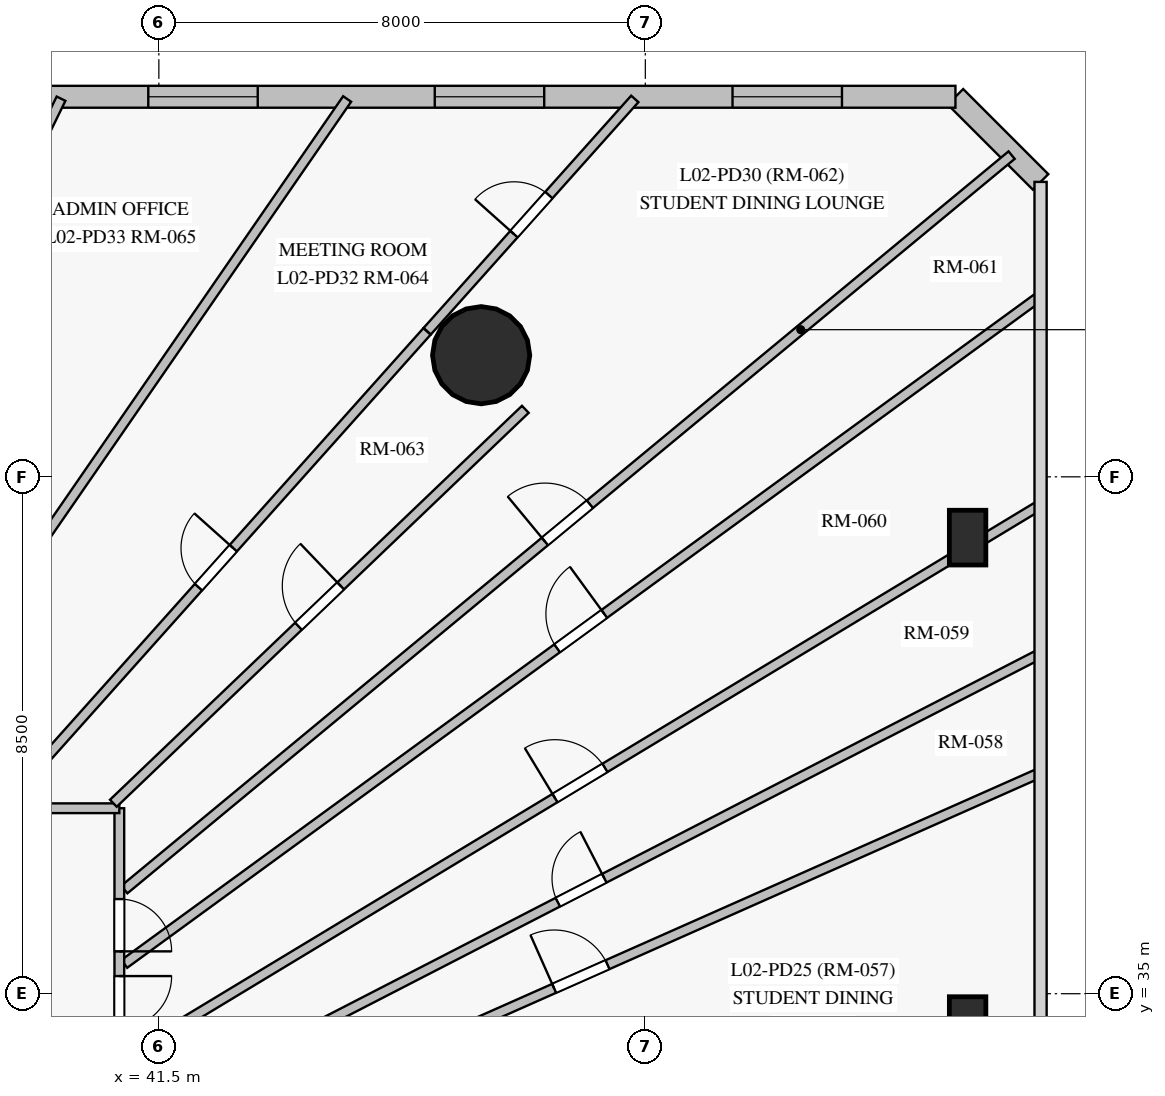
"""IFC4 building model, lengths in metres.
Left out: names, types, materials, properties, quantities, classifications, styles, units other than length and angle.
Written with IfcOpenShell. Run it as: python <this file> out.ifc"""

import sys

from ifc_helpers import new_model, si_unit, direction, frame, frame_2d, origin, origin_with_axes, origin_2d, place, context, subcontext, project, spatial, rectangle, circle, extrude, source, transform, mapped, element, fill, save


model = new_model("IFC4")
c1 = context("Model", 3, precision=1e-05, world=origin(), true_north=direction((0.0, 1.0)))
c2 = subcontext(c1, "Body", "Model", "MODEL_VIEW")
j1 = project(units=[si_unit("LENGTHUNIT", "METRE"), si_unit("PLANEANGLEUNIT", "RADIAN")], contexts=[c1])
p1 = place(None, origin())
s1 = spatial("IfcSite", under=j1, at=p1, CompositionType="ELEMENT")
p2 = place(p1, origin())
s2 = spatial("IfcBuilding", under=s1, at=p2, CompositionType="ELEMENT")
p3 = place(p2, frame((0.0, 0.0, 9.0)))
s3 = spatial("IfcBuildingStorey", under=s2, at=p3, CompositionType="ELEMENT", Elevation=9.0)
m1 = source(origin_with_axes(), c2, "Body", "SweptSolid", [
    extrude(circle(Radius=0.8, at=origin_2d()), origin(), (0.0, 0.0, 1.0), 4.5),
])
p4 = place(p3, frame((46.8, 45.5, 0.0), z_axis=(0.0, 0.0, 1.0), x_axis=(1.0, 0.0, 0.0)))
e1 = element("IfcColumn", 1, at=p4, inside=s3, PredefinedType="COLUMN", context=c2, shape_type="MappedRepresentation", body=[
    mapped(m1, transform((0.0, 0.0, 0.0), scale=1.0)),
])
m2 = source(origin_with_axes(), c2, "Body", "SweptSolid", [
    extrude(rectangle(XDim=0.6, YDim=0.9, at=origin_2d()), origin(), (0.0, 0.0, 1.0), 4.5),
])
for number, where, z_axis, x_axis in (
    (2, (54.8, 34.5, 0.0), (0.0, 0.0, 1.0), (1.0, 0.0, 0.0)),
    (3, (54.8, 42.5, 0.0), (0.0, 0.0, 1.0), (1.0, 0.0, 0.0)),
):
    element("IfcColumn", number, at=place(p3, frame(where, z_axis=z_axis, x_axis=x_axis)), inside=s3, PredefinedType="PILASTER", context=c2, shape_type="MappedRepresentation", body=[
        mapped(m2, transform((0.0, 0.0, 0.0), scale=1.0)),
    ])
p5 = place(p3, frame((56.0, 48.35, 0.0), z_axis=(0.0, 0.0, 1.0), x_axis=(-0.707106781187, 0.707106781187, 0.0)))
e4 = element("IfcWall", 4, at=p5, inside=s3, PredefinedType="SOLIDWALL", context=c2, shape_type="SweptSolid", body=[
    extrude(rectangle(XDim=1.98, YDim=0.36, at=frame_2d((0.99, 0.0))), origin(), (0.0, 0.0, 1.0), 4.2),
])
p6 = place(p3, frame((54.6, 49.75, 0.0), z_axis=(0.0, 0.0, 1.0), x_axis=(-1.0, 0.0, 0.0)))
e5 = element("IfcWall", 5, at=p6, inside=s3, PredefinedType="SOLIDWALL", context=c2, shape_type="SweptSolid", body=[
    extrude(rectangle(XDim=49.25, YDim=0.36, at=frame_2d((24.625, 0.0))), origin(), (0.0, 0.0, 1.0), 4.2),
])
p7 = place(p6, frame((1.866, 0.0, 0.85)))
e6 = element("IfcOpeningElement", 6, at=p7, cuts=e5, PredefinedType="OPENING", context=c2, shape_type="SweptSolid", body=[
    extrude(rectangle(XDim=1.8, YDim=2.2, at=frame_2d((0.9, 1.1))), frame((0.0, 0.19, 0.0), z_axis=(0.0, -1.0, 0.0), x_axis=(1.0, 0.0, 0.0)), (0.0, 0.0, 1.0), 0.38),
])
p8 = place(p6, frame((6.763, 0.0, 0.85)))
e7 = element("IfcOpeningElement", 7, at=p8, cuts=e5, PredefinedType="OPENING", context=c2, shape_type="SweptSolid", body=[
    extrude(rectangle(XDim=1.8, YDim=2.2, at=frame_2d((0.9, 1.1))), frame((0.0, 0.19, 0.0), z_axis=(0.0, -1.0, 0.0), x_axis=(1.0, 0.0, 0.0)), (0.0, 0.0, 1.0), 0.38),
])
p9 = place(p6, frame((11.474, 0.0, 0.85)))
e8 = element("IfcOpeningElement", 8, at=p9, cuts=e5, PredefinedType="OPENING", context=c2, shape_type="SweptSolid", body=[
    extrude(rectangle(XDim=1.8, YDim=2.2, at=frame_2d((0.9, 1.1))), frame((0.0, 0.19, 0.0), z_axis=(0.0, -1.0, 0.0), x_axis=(1.0, 0.0, 0.0)), (0.0, 0.0, 1.0), 0.38),
])
p10 = place(p6, frame((16.083, 0.0, 0.85)))
e9 = element("IfcOpeningElement", 9, at=p10, cuts=e5, PredefinedType="OPENING", context=c2, shape_type="SweptSolid", body=[
    extrude(rectangle(XDim=1.8, YDim=2.2, at=frame_2d((0.9, 1.1))), frame((0.0, 0.19, 0.0), z_axis=(0.0, -1.0, 0.0), x_axis=(1.0, 0.0, 0.0)), (0.0, 0.0, 1.0), 0.38),
])
p11 = place(p6, frame((20.595, 0.0, 0.85)))
e10 = element("IfcOpeningElement", 10, at=p11, cuts=e5, PredefinedType="OPENING", context=c2, shape_type="SweptSolid", body=[
    extrude(rectangle(XDim=1.8, YDim=2.2, at=frame_2d((0.9, 1.1))), frame((0.0, 0.19, 0.0), z_axis=(0.0, -1.0, 0.0), x_axis=(1.0, 0.0, 0.0)), (0.0, 0.0, 1.0), 0.38),
])
p12 = place(p6, frame((24.23, 0.0, 0.85)))
e11 = element("IfcOpeningElement", 11, at=p12, cuts=e5, PredefinedType="OPENING", context=c2, shape_type="SweptSolid", body=[
    extrude(rectangle(XDim=1.8, YDim=2.2, at=frame_2d((0.9, 1.1))), frame((0.0, 0.19, 0.0), z_axis=(0.0, -1.0, 0.0), x_axis=(1.0, 0.0, 0.0)), (0.0, 0.0, 1.0), 0.38),
])
p13 = place(p6, frame((30.4, 0.0, 0.85)))
e12 = element("IfcOpeningElement", 12, at=p13, cuts=e5, PredefinedType="OPENING", context=c2, shape_type="SweptSolid", body=[
    extrude(rectangle(XDim=1.8, YDim=2.2, at=frame_2d((0.9, 1.1))), frame((0.0, 0.19, 0.0), z_axis=(0.0, -1.0, 0.0), x_axis=(1.0, 0.0, 0.0)), (0.0, 0.0, 1.0), 0.38),
])
p14 = place(p6, frame((35.42, 0.0, 0.85)))
e13 = element("IfcOpeningElement", 13, at=p14, cuts=e5, PredefinedType="OPENING", context=c2, shape_type="SweptSolid", body=[
    extrude(rectangle(XDim=1.8, YDim=2.2, at=frame_2d((0.9, 1.1))), frame((0.0, 0.19, 0.0), z_axis=(0.0, -1.0, 0.0), x_axis=(1.0, 0.0, 0.0)), (0.0, 0.0, 1.0), 0.38),
])
p15 = place(p6, frame((40.69, 0.0, 0.85)))
e14 = element("IfcOpeningElement", 14, at=p15, cuts=e5, PredefinedType="OPENING", context=c2, shape_type="SweptSolid", body=[
    extrude(rectangle(XDim=1.8, YDim=2.2, at=frame_2d((0.9, 1.1))), frame((0.0, 0.19, 0.0), z_axis=(0.0, -1.0, 0.0), x_axis=(1.0, 0.0, 0.0)), (0.0, 0.0, 1.0), 0.38),
])
p16 = place(p6, frame((45.58, 0.0, 0.85)))
e15 = element("IfcOpeningElement", 15, at=p16, cuts=e5, PredefinedType="OPENING", context=c2, shape_type="SweptSolid", body=[
    extrude(rectangle(XDim=1.8, YDim=2.2, at=frame_2d((0.9, 1.1))), frame((0.0, 0.19, 0.0), z_axis=(0.0, -1.0, 0.0), x_axis=(1.0, 0.0, 0.0)), (0.0, 0.0, 1.0), 0.38),
])
p17 = place(p3, frame((40.932, 36.712, 0.0), z_axis=(0.0, 0.0, 1.0), x_axis=(0.770350004389, 0.637621259635, 0.0)))
e16 = element("IfcWall", 16, at=p17, inside=s3, PredefinedType="PARTITIONING", context=c2, shape_type="SweptSolid", body=[
    extrude(rectangle(XDim=18.942, YDim=0.16, at=frame_2d((9.471, 0.0))), origin(), (0.0, 0.0, 1.0), 4.2),
])
p18 = place(p17, frame((8.979, 0.0, 0.0)))
e17 = element("IfcOpeningElement", 17, at=p18, cuts=e16, PredefinedType="OPENING", context=c2, shape_type="SweptSolid", body=[
    extrude(rectangle(XDim=0.96, YDim=2.15, at=frame_2d((0.48, 1.075))), frame((0.0, 0.09, 0.0), z_axis=(0.0, -1.0, 0.0), x_axis=(1.0, 0.0, 0.0)), (0.0, 0.0, 1.0), 0.18),
])
p19 = place(p3, frame((40.932, 35.49, 0.0), z_axis=(0.0, 0.0, 1.0), x_axis=(0.808014689356, 0.589162339076, 0.0)))
e18 = element("IfcWall", 18, at=p19, inside=s3, PredefinedType="PARTITIONING", context=c2, shape_type="SweptSolid", body=[
    extrude(rectangle(XDim=18.602, YDim=0.16, at=frame_2d((9.301, 0.0))), origin(), (0.0, 0.0, 1.0), 4.2),
])
p20 = place(p19, frame((8.808, 0.0, 0.0)))
e19 = element("IfcOpeningElement", 19, at=p20, cuts=e18, PredefinedType="OPENING", context=c2, shape_type="SweptSolid", body=[
    extrude(rectangle(XDim=0.96, YDim=2.15, at=frame_2d((0.48, 1.075))), frame((0.0, 0.09, 0.0), z_axis=(0.0, -1.0, 0.0), x_axis=(1.0, 0.0, 0.0)), (0.0, 0.0, 1.0), 0.18),
])
p21 = place(p3, frame((40.85, 38.05, 0.0), z_axis=(0.0, 0.0, 1.0), x_axis=(0.0, -1.0, 0.0)))
e20 = element("IfcWall", 20, at=p21, inside=s3, PredefinedType="PARTITIONING", context=c2, shape_type="SweptSolid", body=[
    extrude(rectangle(XDim=18.508, YDim=0.16, at=frame_2d((9.254, 0.0))), origin(), (0.0, 0.0, 1.0), 3.25),
])
p22 = place(p21, frame((13.87, 0.0, 0.0)))
e21 = element("IfcOpeningElement", 21, at=p22, cuts=e20, PredefinedType="OPENING", context=c2, shape_type="SweptSolid", body=[
    extrude(rectangle(XDim=0.96, YDim=2.15, at=frame_2d((0.48, 1.075))), frame((0.0, 0.09, 0.0), z_axis=(0.0, -1.0, 0.0), x_axis=(1.0, 0.0, 0.0)), (0.0, 0.0, 1.0), 0.18),
])
p23 = place(p21, frame((8.695, 0.0, 0.0)))
e22 = element("IfcOpeningElement", 22, at=p23, cuts=e20, PredefinedType="OPENING", context=c2, shape_type="SweptSolid", body=[
    extrude(rectangle(XDim=0.96, YDim=2.15, at=frame_2d((0.48, 1.075))), frame((0.0, 0.09, 0.0), z_axis=(0.0, -1.0, 0.0), x_axis=(1.0, 0.0, 0.0)), (0.0, 0.0, 1.0), 0.18),
])
p24 = place(p21, frame((6.334, 0.0, 0.0)))
e23 = element("IfcOpeningElement", 23, at=p24, cuts=e20, PredefinedType="OPENING", context=c2, shape_type="SweptSolid", body=[
    extrude(rectangle(XDim=0.96, YDim=2.15, at=frame_2d((0.48, 1.075))), frame((0.0, 0.09, 0.0), z_axis=(0.0, -1.0, 0.0), x_axis=(1.0, 0.0, 0.0)), (0.0, 0.0, 1.0), 0.18),
])
p25 = place(p21, frame((12.2, 0.0, 0.0)))
e24 = element("IfcOpeningElement", 24, at=p25, cuts=e20, PredefinedType="OPENING", context=c2, shape_type="SweptSolid", body=[
    extrude(rectangle(XDim=0.96, YDim=2.15, at=frame_2d((0.48, 1.075))), frame((0.0, 0.09, 0.0), z_axis=(0.0, -1.0, 0.0), x_axis=(1.0, 0.0, 0.0)), (0.0, 0.0, 1.0), 0.18),
])
p26 = place(p21, frame((2.76, 0.0, 0.0)))
e25 = element("IfcOpeningElement", 25, at=p26, cuts=e20, PredefinedType="OPENING", context=c2, shape_type="SweptSolid", body=[
    extrude(rectangle(XDim=0.86, YDim=2.04, at=frame_2d((0.43, 1.02))), frame((0.0, 0.09, 0.0), z_axis=(0.0, -1.0, 0.0), x_axis=(1.0, 0.0, 0.0)), (0.0, 0.0, 1.0), 0.18),
])
p27 = place(p21, frame((1.494, 0.0, 0.0)))
e26 = element("IfcOpeningElement", 26, at=p27, cuts=e20, PredefinedType="OPENING", context=c2, shape_type="SweptSolid", body=[
    extrude(rectangle(XDim=0.86, YDim=2.04, at=frame_2d((0.43, 1.02))), frame((0.0, 0.09, 0.0), z_axis=(0.0, -1.0, 0.0), x_axis=(1.0, 0.0, 0.0)), (0.0, 0.0, 1.0), 0.18),
])
p28 = place(p3, frame((40.919, 33.932, 0.0), z_axis=(0.0, 0.0, 1.0), x_axis=(0.855961001887, 0.517040388412, 0.0)))
e27 = element("IfcWall", 27, at=p28, inside=s3, PredefinedType="PARTITIONING", context=c2, shape_type="SweptSolid", body=[
    extrude(rectangle(XDim=17.579, YDim=0.16, at=frame_2d((8.789, 0.0))), origin(), (0.0, 0.0, 1.0), 4.2),
])
p29 = place(p28, frame((8.289, 0.0, 0.0)))
e28 = element("IfcOpeningElement", 28, at=p29, cuts=e27, PredefinedType="OPENING", context=c2, shape_type="SweptSolid", body=[
    extrude(rectangle(XDim=0.96, YDim=2.15, at=frame_2d((0.48, 1.075))), frame((0.0, 0.09, 0.0), z_axis=(0.0, -1.0, 0.0), x_axis=(1.0, 0.0, 0.0)), (0.0, 0.0, 1.0), 0.18),
])
p30 = place(p3, frame((40.919, 32.827, 0.0), z_axis=(0.0, 0.0, 1.0), x_axis=(0.8890624387, 0.457785954452, 0.0)))
e29 = element("IfcWall", 29, at=p30, inside=s3, PredefinedType="PARTITIONING", context=c2, shape_type="SweptSolid", body=[
    extrude(rectangle(XDim=16.927, YDim=0.16, at=frame_2d((8.464, 0.0))), origin(), (0.0, 0.0, 1.0), 4.2),
])
p31 = place(p30, frame((8.033, 0.0, 0.0)))
e30 = element("IfcOpeningElement", 30, at=p31, cuts=e29, PredefinedType="OPENING", context=c2, shape_type="SweptSolid", body=[
    extrude(rectangle(XDim=0.86, YDim=2.04, at=frame_2d((0.43, 1.02))), frame((0.0, 0.09, 0.0), z_axis=(0.0, -1.0, 0.0), x_axis=(1.0, 0.0, 0.0)), (0.0, 0.0, 1.0), 0.18),
])
p32 = place(p3, frame((40.932, 31.951, 0.0), z_axis=(0.0, 0.0, 1.0), x_axis=(0.914043329039, 0.405616558636, 0.0)))
e31 = element("IfcWall", 31, at=p32, inside=s3, PredefinedType="PARTITIONING", context=c2, shape_type="SweptSolid", body=[
    extrude(rectangle(XDim=16.452, YDim=0.16, at=frame_2d((8.226, 0.0))), origin(), (0.0, 0.0, 1.0), 4.2),
])
p33 = place(p32, frame((7.733, 0.0, 0.0)))
e32 = element("IfcOpeningElement", 32, at=p33, cuts=e31, PredefinedType="OPENING", context=c2, shape_type="SweptSolid", body=[
    extrude(rectangle(XDim=0.96, YDim=2.15, at=frame_2d((0.48, 1.075))), frame((0.0, 0.09, 0.0), z_axis=(0.0, -1.0, 0.0), x_axis=(1.0, 0.0, 0.0)), (0.0, 0.0, 1.0), 0.18),
])
p34 = place(p3, frame((25.4, 38.05, 0.0), z_axis=(0.0, 0.0, 1.0), x_axis=(1.0, 0.0, 0.0)))
e33 = element("IfcWall", 33, at=p34, inside=s3, PredefinedType="PARTITIONING", context=c2, shape_type="SweptSolid", body=[
    extrude(rectangle(XDim=15.45, YDim=0.16, at=frame_2d((7.725, 0.0))), origin(), (0.0, 0.0, 1.0), 4.2),
])
p35 = place(p34, frame((11.802, 0.0, 0.0)))
e34 = element("IfcOpeningElement", 34, at=p35, cuts=e33, PredefinedType="OPENING", context=c2, shape_type="SweptSolid", body=[
    extrude(rectangle(XDim=0.96, YDim=2.15, at=frame_2d((0.48, 1.075))), frame((0.0, 0.09, 0.0), z_axis=(0.0, -1.0, 0.0), x_axis=(1.0, 0.0, 0.0)), (0.0, 0.0, 1.0), 0.18),
])
p36 = place(p34, frame((9.567, 0.0, 0.0)))
e35 = element("IfcOpeningElement", 35, at=p36, cuts=e33, PredefinedType="OPENING", context=c2, shape_type="SweptSolid", body=[
    extrude(rectangle(XDim=0.96, YDim=2.15, at=frame_2d((0.48, 1.075))), frame((0.0, 0.09, 0.0), z_axis=(0.0, -1.0, 0.0), x_axis=(1.0, 0.0, 0.0)), (0.0, 0.0, 1.0), 0.18),
])
p37 = place(p34, frame((7.25, 0.0, 0.0)))
e36 = element("IfcOpeningElement", 36, at=p37, cuts=e33, PredefinedType="OPENING", context=c2, shape_type="SweptSolid", body=[
    extrude(rectangle(XDim=0.96, YDim=2.15, at=frame_2d((0.48, 1.075))), frame((0.0, 0.09, 0.0), z_axis=(0.0, -1.0, 0.0), x_axis=(1.0, 0.0, 0.0)), (0.0, 0.0, 1.0), 0.18),
])
p38 = place(p34, frame((4.933, 0.0, 0.0)))
e37 = element("IfcOpeningElement", 37, at=p38, cuts=e33, PredefinedType="OPENING", context=c2, shape_type="SweptSolid", body=[
    extrude(rectangle(XDim=0.96, YDim=2.15, at=frame_2d((0.48, 1.075))), frame((0.0, 0.09, 0.0), z_axis=(0.0, -1.0, 0.0), x_axis=(1.0, 0.0, 0.0)), (0.0, 0.0, 1.0), 0.18),
])
p39 = place(p34, frame((1.698, 0.0, 0.0)))
e38 = element("IfcOpeningElement", 38, at=p39, cuts=e33, PredefinedType="OPENING", context=c2, shape_type="SweptSolid", body=[
    extrude(rectangle(XDim=0.96, YDim=2.15, at=frame_2d((0.48, 1.075))), frame((0.0, 0.09, 0.0), z_axis=(0.0, -1.0, 0.0), x_axis=(1.0, 0.0, 0.0)), (0.0, 0.0, 1.0), 0.18),
])
p40 = place(p34, frame((3.164, 0.0, 0.0)))
e39 = element("IfcOpeningElement", 39, at=p40, cuts=e33, PredefinedType="OPENING", context=c2, shape_type="SweptSolid", body=[
    extrude(rectangle(XDim=0.86, YDim=2.04, at=frame_2d((0.43, 1.02))), frame((0.0, 0.09, 0.0), z_axis=(0.0, -1.0, 0.0), x_axis=(1.0, 0.0, 0.0)), (0.0, 0.0, 1.0), 0.18),
])
p41 = place(p3, frame((36.602, 38.132, 0.0), z_axis=(0.0, 0.0, 1.0), x_axis=(0.568083583137, 0.822970863743, 0.0)))
e40 = element("IfcWall", 40, at=p41, inside=s3, PredefinedType="PARTITIONING", context=c2, shape_type="SweptSolid", body=[
    extrude(rectangle(XDim=14.073, YDim=0.16, at=frame_2d((7.036, 0.0))), origin(), (0.0, 0.0, 1.0), 4.2),
])
p42 = place(p3, frame((34.233, 38.118, 0.0), z_axis=(0.0, 0.0, 1.0), x_axis=(0.438369218091, 0.898794986985, 0.0)))
e41 = element("IfcWall", 41, at=p42, inside=s3, PredefinedType="PARTITIONING", context=c2, shape_type="SweptSolid", body=[
    extrude(rectangle(XDim=12.906, YDim=0.16, at=frame_2d((6.453, 0.0))), origin(), (0.0, 0.0, 1.0), 4.2),
])
p43 = place(p3, frame((38.966, 38.121, 0.0), z_axis=(0.0, 0.0, 1.0), x_axis=(0.666343454818, 0.745644955875, 0.0)))
e42 = element("IfcWall", 42, at=p43, inside=s3, PredefinedType="PARTITIONING", context=c2, shape_type="SweptSolid", body=[
    extrude(rectangle(XDim=10.421, YDim=0.16, at=frame_2d((5.21, 0.0))), origin(), (0.0, 0.0, 1.0), 4.2),
])
p44 = place(p43, frame((4.781, 0.0, 0.0)))
e43 = element("IfcOpeningElement", 43, at=p44, cuts=e42, PredefinedType="OPENING", context=c2, shape_type="SweptSolid", body=[
    extrude(rectangle(XDim=0.86, YDim=2.04, at=frame_2d((0.43, 1.02))), frame((0.0, 0.09, 0.0), z_axis=(0.0, -1.0, 0.0), x_axis=(1.0, 0.0, 0.0)), (0.0, 0.0, 1.0), 0.18),
])
p45 = place(p3, frame((40.752, 38.132, 0.0), z_axis=(0.0, 0.0, 1.0), x_axis=(0.722765157253, 0.69109371829, 0.0)))
e44 = element("IfcWall", 44, at=p45, inside=s3, PredefinedType="PARTITIONING", context=c2, shape_type="SweptSolid", body=[
    extrude(rectangle(XDim=9.374, YDim=0.16, at=frame_2d((4.687, 0.0))), origin(), (0.0, 0.0, 1.0), 3.25),
])
p46 = place(p45, frame((4.212, 0.0, 0.0)))
e45 = element("IfcOpeningElement", 45, at=p46, cuts=e44, PredefinedType="OPENING", context=c2, shape_type="SweptSolid", body=[
    extrude(rectangle(XDim=0.96, YDim=2.15, at=frame_2d((0.48, 1.075))), frame((0.0, 0.09, 0.0), z_axis=(0.0, -1.0, 0.0), x_axis=(1.0, 0.0, 0.0)), (0.0, 0.0, 1.0), 0.18),
])
p47 = place(p3, frame((45.913, 45.895, 0.0), z_axis=(0.0, 0.0, 1.0), x_axis=(0.666346204372, 0.745642498735, 0.0)))
e46 = element("IfcWall", 46, at=p47, inside=s3, PredefinedType="PARTITIONING", context=c2, shape_type="SweptSolid", body=[
    extrude(rectangle(XDim=5.123, YDim=0.16, at=frame_2d((2.562, 0.0))), origin(), (0.0, 0.0, 1.0), 4.2),
])
p48 = place(p47, frame((2.142, 0.0, 0.0)))
e47 = element("IfcOpeningElement", 47, at=p48, cuts=e46, PredefinedType="OPENING", context=c2, shape_type="SweptSolid", body=[
    extrude(rectangle(XDim=0.86, YDim=2.04, at=frame_2d((0.43, 1.02))), frame((0.0, 0.09, 0.0), z_axis=(0.0, -1.0, 0.0), x_axis=(1.0, 0.0, 0.0)), (0.0, 0.0, 1.0), 0.18),
])
m3 = source(origin_with_axes(), c2, "Body", "SweptSolid", [
    extrude(rectangle(XDim=1.8, YDim=2.2, at=frame_2d((0.9, 1.1))), frame((0.0, 0.03, 0.0), z_axis=(0.0, -1.0, 0.0), x_axis=(1.0, 0.0, 0.0)), (0.0, 0.0, 1.0), 0.06),
])
p49 = place(p7, origin())
e48 = element("IfcWindow", 48, at=p49, inside=s3, PartitioningType="SINGLE_PANEL", PredefinedType="WINDOW", context=c2, shape_type="MappedRepresentation", body=[
    mapped(m3, transform((0.0, 0.0, 0.0), scale=1.0)),
])
fill(e6, e48)
p50 = place(p8, origin())
e49 = element("IfcWindow", 49, at=p50, inside=s3, PartitioningType="SINGLE_PANEL", PredefinedType="WINDOW", context=c2, shape_type="MappedRepresentation", body=[
    mapped(m3, transform((0.0, 0.0, 0.0), scale=1.0)),
])
fill(e7, e49)
p51 = place(p9, origin())
e50 = element("IfcWindow", 50, at=p51, inside=s3, PartitioningType="SINGLE_PANEL", PredefinedType="WINDOW", context=c2, shape_type="MappedRepresentation", body=[
    mapped(m3, transform((0.0, 0.0, 0.0), scale=1.0)),
])
fill(e8, e50)
m4 = source(origin_with_axes(), c2, "Body", "SweptSolid", [
    extrude(rectangle(XDim=0.96, YDim=2.15, at=frame_2d((0.48, 1.075))), frame((0.0, 0.025, 0.0), z_axis=(0.0, -1.0, 0.0), x_axis=(1.0, 0.0, 0.0)), (0.0, 0.0, 1.0), 0.05),
])
p52 = place(p33, origin())
e51 = element("IfcDoor", 51, at=p52, inside=s3, OperationType="SINGLE_SWING_LEFT", PredefinedType="DOOR", context=c2, shape_type="MappedRepresentation", body=[
    mapped(m4, transform((0.0, 0.0, 0.0), scale=1.0)),
])
fill(e32, e51)
p53 = place(p29, origin())
e52 = element("IfcDoor", 52, at=p53, inside=s3, OperationType="SINGLE_SWING_LEFT", PredefinedType="DOOR", context=c2, shape_type="MappedRepresentation", body=[
    mapped(m4, transform((0.0, 0.0, 0.0), scale=1.0)),
])
fill(e28, e52)
p54 = place(p20, origin())
e53 = element("IfcDoor", 53, at=p54, inside=s3, OperationType="SINGLE_SWING_RIGHT", PredefinedType="DOOR", context=c2, shape_type="MappedRepresentation", body=[
    mapped(m4, transform((0.0, 0.0, 0.0), scale=1.0)),
])
fill(e19, e53)
p55 = place(p18, origin())
e54 = element("IfcDoor", 54, at=p55, inside=s3, OperationType="SINGLE_SWING_LEFT", PredefinedType="DOOR", context=c2, shape_type="MappedRepresentation", body=[
    mapped(m4, transform((0.0, 0.0, 0.0), scale=1.0)),
])
fill(e17, e54)
p56 = place(p46, origin())
e55 = element("IfcDoor", 55, at=p56, inside=s3, OperationType="SINGLE_SWING_RIGHT", PredefinedType="DOOR", context=c2, shape_type="MappedRepresentation", body=[
    mapped(m4, transform((0.0, 0.0, 0.0), scale=1.0)),
])
fill(e45, e55)
m5 = source(origin_with_axes(), c2, "Body", "SweptSolid", [
    extrude(rectangle(XDim=0.86, YDim=2.04, at=frame_2d((0.43, 1.02))), frame((0.0, 0.025, 0.0), z_axis=(0.0, -1.0, 0.0), x_axis=(1.0, 0.0, 0.0)), (0.0, 0.0, 1.0), 0.05),
])
p57 = place(p31, origin())
e56 = element("IfcDoor", 56, at=p57, inside=s3, OperationType="SINGLE_SWING_RIGHT", PredefinedType="DOOR", context=c2, shape_type="MappedRepresentation", body=[
    mapped(m5, transform((0.0, 0.0, 0.0), scale=1.0)),
])
fill(e30, e56)
p58 = place(p26, origin())
e57 = element("IfcDoor", 57, at=p58, inside=s3, OperationType="SINGLE_SWING_LEFT", PredefinedType="DOOR", context=c2, shape_type="MappedRepresentation", body=[
    mapped(m5, transform((0.0, 0.0, 0.0), scale=1.0)),
])
fill(e25, e57)
p59 = place(p27, origin())
e58 = element("IfcDoor", 58, at=p59, inside=s3, OperationType="SINGLE_SWING_RIGHT", PredefinedType="DOOR", context=c2, shape_type="MappedRepresentation", body=[
    mapped(m5, transform((0.0, 0.0, 0.0), scale=1.0)),
])
fill(e26, e58)
p60 = place(p48, origin())
e59 = element("IfcDoor", 59, at=p60, inside=s3, OperationType="SINGLE_SWING_LEFT", PredefinedType="DOOR", context=c2, shape_type="MappedRepresentation", body=[
    mapped(m5, transform((0.0, 0.0, 0.0), scale=1.0)),
])
fill(e47, e59)
p61 = place(p44, origin())
e60 = element("IfcDoor", 60, at=p61, inside=s3, OperationType="SINGLE_SWING_RIGHT", PredefinedType="DOOR", context=c2, shape_type="MappedRepresentation", body=[
    mapped(m5, transform((0.0, 0.0, 0.0), scale=1.0)),
])
fill(e43, e60)
save(model, sys.argv[1])
